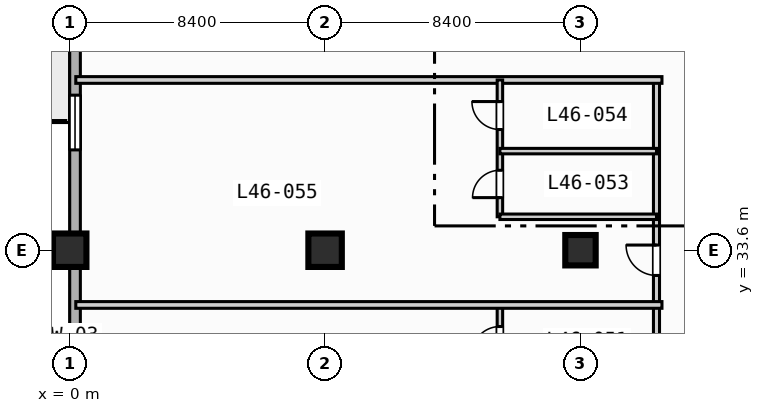
"""IFC4 building model, lengths in metres.
Left out: names, types, materials, properties, quantities, classifications, styles, units other than length and angle.
Written with IfcOpenShell. Run it as: python <this file> out.ifc"""

import sys

from ifc_helpers import new_model, si_unit, direction, frame, frame_2d, origin, origin_2d, place, context, subcontext, project, spatial, rectangle, extrude, element, fill, save


model = new_model("IFC4")
c1 = context("Model", 3, precision=1e-05, world=origin(), true_north=direction((0.0, 1.0)))
c2 = subcontext(c1, "Body", "Model", "MODEL_VIEW")
j1 = project(units=[si_unit("LENGTHUNIT", "METRE"), si_unit("PLANEANGLEUNIT", "RADIAN")], contexts=[c1])
p1 = place(None, origin())
s1 = spatial("IfcSite", under=j1, at=p1, CompositionType="ELEMENT")
p2 = place(p1, origin())
s2 = spatial("IfcBuilding", under=s1, at=p2, CompositionType="ELEMENT")
p3 = place(p2, frame((0.0, 0.0, 190.2)))
s3 = spatial("IfcBuildingStorey", under=s2, at=p3, CompositionType="ELEMENT", Elevation=190.2)
for number, where, z_axis, x_axis in (
    (1, (0.0, 33.6, 0.0), (0.0, 0.0, 1.0), (1.0, 0.0, 0.0)),
    (2, (8.4, 33.6, 0.0), (0.0, 0.0, 1.0), (1.0, 0.0, 0.0)),
):
    element("IfcColumn", number, at=place(p3, frame(where, z_axis=z_axis, x_axis=x_axis)), inside=s3, PredefinedType="COLUMN", context=c2, shape_type="SweptSolid", body=[
        extrude(rectangle(XDim=1.1, YDim=1.1, at=origin_2d()), origin(), (0.0, 0.0, 1.0), 3.7),
    ])
p4 = place(p3, frame((16.8, 33.6, 0.0), z_axis=(0.0, 0.0, 1.0), x_axis=(1.0, 0.0, 0.0)))
e3 = element("IfcColumn", 3, at=p4, inside=s3, PredefinedType="COLUMN", context=c2, shape_type="SweptSolid", body=[
    extrude(rectangle(XDim=1.0, YDim=1.0, at=origin_2d()), origin(), (0.0, 0.0, 1.0), 3.7),
])
p5 = place(p3, frame((0.175, 3.175, 0.0), z_axis=(0.0, 0.0, 1.0), x_axis=(0.0, 1.0, 0.0)))
e4 = element("IfcWall", 4, at=p5, inside=s3, PredefinedType="STANDARD", context=c2, shape_type="SweptSolid", body=[
    extrude(rectangle(XDim=69.25, YDim=0.35, at=frame_2d((34.625, 0.0))), origin(), (0.0, 0.0, 1.0), 3.47),
])
p6 = place(p5, frame((42.325, 0.0, 0.0)))
e5 = element("IfcOpeningElement", 5, at=p6, cuts=e4, PredefinedType="OPENING", context=c2, shape_type="SweptSolid", body=[
    extrude(rectangle(XDim=1.4, YDim=2.2, at=frame_2d((0.7, 1.1))), frame((0.0, 0.185, 0.0), z_axis=(0.0, -1.0, 0.0), x_axis=(1.0, 0.0, 0.0)), (0.0, 0.0, 1.0), 0.37),
])
p7 = place(p5, frame((25.025, 0.0, 0.85)))
e6 = element("IfcOpeningElement", 6, at=p7, cuts=e4, PredefinedType="OPENING", context=c2, shape_type="SweptSolid", body=[
    extrude(rectangle(XDim=2.4, YDim=1.95, at=frame_2d((1.2, 0.975))), frame((0.0, 0.185, 0.0), z_axis=(0.0, -1.0, 0.0), x_axis=(1.0, 0.0, 0.0)), (0.0, 0.0, 1.0), 0.37),
])
p8 = place(p5, frame((33.725, 0.0, 0.85)))
e7 = element("IfcOpeningElement", 7, at=p8, cuts=e4, PredefinedType="OPENING", context=c2, shape_type="SweptSolid", body=[
    extrude(rectangle(XDim=1.8, YDim=1.8, at=frame_2d((0.9, 0.9))), frame((0.0, 0.185, 0.0), z_axis=(0.0, -1.0, 0.0), x_axis=(1.0, 0.0, 0.0)), (0.0, 0.0, 1.0), 0.37),
])
p9 = place(p5, frame((58.375, 0.0, 0.85)))
e8 = element("IfcOpeningElement", 8, at=p9, cuts=e4, PredefinedType="OPENING", context=c2, shape_type="SweptSolid", body=[
    extrude(rectangle(XDim=1.8, YDim=1.8, at=frame_2d((0.9, 0.9))), frame((0.0, 0.185, 0.0), z_axis=(0.0, -1.0, 0.0), x_axis=(1.0, 0.0, 0.0)), (0.0, 0.0, 1.0), 0.37),
])
p10 = place(p5, frame((64.775, 0.0, 0.85)))
e9 = element("IfcOpeningElement", 9, at=p10, cuts=e4, PredefinedType="OPENING", context=c2, shape_type="SweptSolid", body=[
    extrude(rectangle(XDim=1.8, YDim=1.8, at=frame_2d((0.9, 0.9))), frame((0.0, 0.185, 0.0), z_axis=(0.0, -1.0, 0.0), x_axis=(1.0, 0.0, 0.0)), (0.0, 0.0, 1.0), 0.37),
])
p11 = place(p3, frame((19.3, 24.4, 0.0), z_axis=(0.0, 0.0, 1.0), x_axis=(0.0, 1.0, 0.0)))
e10 = element("IfcWall", 10, at=p11, inside=s3, PredefinedType="PARTITIONING", context=c2, shape_type="SweptSolid", body=[
    extrude(rectangle(XDim=14.8, YDim=0.2, at=frame_2d((7.4, 0.0))), origin(), (0.0, 0.0, 1.0), 3.47),
])
p12 = place(p11, frame((0.97, 0.0, 0.0)))
e11 = element("IfcOpeningElement", 11, at=p12, cuts=e10, PredefinedType="OPENING", context=c2, shape_type="SweptSolid", body=[
    extrude(rectangle(XDim=1.0, YDim=2.15, at=frame_2d((0.5, 1.075))), frame((0.0, 0.11, 0.0), z_axis=(0.0, -1.0, 0.0), x_axis=(1.0, 0.0, 0.0)), (0.0, 0.0, 1.0), 0.22),
])
p13 = place(p11, frame((8.37, 0.0, 0.0)))
e12 = element("IfcOpeningElement", 12, at=p13, cuts=e10, PredefinedType="OPENING", context=c2, shape_type="SweptSolid", body=[
    extrude(rectangle(XDim=1.0, YDim=2.15, at=frame_2d((0.5, 1.075))), frame((0.0, 0.11, 0.0), z_axis=(0.0, -1.0, 0.0), x_axis=(1.0, 0.0, 0.0)), (0.0, 0.0, 1.0), 0.22),
])
p14 = place(p3, frame((14.15, 27.3, 0.0), z_axis=(0.0, 0.0, 1.0), x_axis=(0.0, 1.0, 0.0)))
e13 = element("IfcWall", 13, at=p14, inside=s3, PredefinedType="PLUMBINGWALL", context=c2, shape_type="SweptSolid", body=[
    extrude(rectangle(XDim=4.5, YDim=0.18, at=frame_2d((2.25, 0.0))), origin(), (0.0, 0.0, 1.0), 3.47),
])
p15 = place(p14, frame((0.63, 0.0, 0.0)))
e14 = element("IfcOpeningElement", 14, at=p15, cuts=e13, PredefinedType="OPENING", context=c2, shape_type="SweptSolid", body=[
    extrude(rectangle(XDim=0.9, YDim=2.1, at=frame_2d((0.45, 1.05))), frame((0.0, 0.1, 0.0), z_axis=(0.0, -1.0, 0.0), x_axis=(1.0, 0.0, 0.0)), (0.0, 0.0, 1.0), 0.2),
])
p16 = place(p14, frame((2.87, 0.0, 0.0)))
e15 = element("IfcOpeningElement", 15, at=p16, cuts=e13, PredefinedType="OPENING", context=c2, shape_type="SweptSolid", body=[
    extrude(rectangle(XDim=0.92, YDim=2.1, at=frame_2d((0.46, 1.05))), frame((0.0, 0.1, 0.0), z_axis=(0.0, -1.0, 0.0), x_axis=(1.0, 0.0, 0.0)), (0.0, 0.0, 1.0), 0.2),
])
for number, where, z_axis, x_axis in (
    (16, (0.2, 31.8, 0.0), (0.0, 0.0, 1.0), (1.0, 0.0, 0.0)),
    (17, (0.2, 39.2, 0.0), (0.0, 0.0, 1.0), (1.0, 0.0, 0.0)),
):
    element("IfcWall", number, at=place(p3, frame(where, z_axis=z_axis, x_axis=x_axis)), inside=s3, PredefinedType="PARTITIONING", context=c2, shape_type="SweptSolid", body=[
        extrude(rectangle(XDim=19.28, YDim=0.22, at=frame_2d((9.64, 0.0))), origin(), (0.0, 0.0, 1.0), 3.47),
    ])
p17 = place(p3, frame((14.15, 34.7, 0.0), z_axis=(0.0, 0.0, 1.0), x_axis=(0.0, 1.0, 0.0)))
e18 = element("IfcWall", 18, at=p17, inside=s3, PredefinedType="PLUMBINGWALL", context=c2, shape_type="SweptSolid", body=[
    extrude(rectangle(XDim=4.5, YDim=0.18, at=frame_2d((2.25, 0.0))), origin(), (0.0, 0.0, 1.0), 3.47),
])
p18 = place(p17, frame((0.63, 0.0, 0.0)))
e19 = element("IfcOpeningElement", 19, at=p18, cuts=e18, PredefinedType="OPENING", context=c2, shape_type="SweptSolid", body=[
    extrude(rectangle(XDim=0.9, YDim=2.1, at=frame_2d((0.45, 1.05))), frame((0.0, 0.1, 0.0), z_axis=(0.0, -1.0, 0.0), x_axis=(1.0, 0.0, 0.0)), (0.0, 0.0, 1.0), 0.2),
])
p19 = place(p17, frame((2.87, 0.0, 0.0)))
e20 = element("IfcOpeningElement", 20, at=p19, cuts=e18, PredefinedType="OPENING", context=c2, shape_type="SweptSolid", body=[
    extrude(rectangle(XDim=0.92, YDim=2.1, at=frame_2d((0.46, 1.05))), frame((0.0, 0.1, 0.0), z_axis=(0.0, -1.0, 0.0), x_axis=(1.0, 0.0, 0.0)), (0.0, 0.0, 1.0), 0.2),
])
for number, where, z_axis, x_axis in (
    (21, (14.15, 34.7, 0.0), (0.0, 0.0, 1.0), (1.0, 0.0, 0.0)),
    (22, (14.15, 36.86, 0.0), (0.0, 0.0, 1.0), (1.0, 0.0, 0.0)),
):
    element("IfcWall", number, at=place(p3, frame(where, z_axis=z_axis, x_axis=x_axis)), inside=s3, PredefinedType="PLUMBINGWALL", context=c2, shape_type="SweptSolid", body=[
        extrude(rectangle(XDim=5.15, YDim=0.18, at=frame_2d((2.575, 0.0))), origin(), (0.0, 0.0, 1.0), 3.47),
    ])
p20 = place(p8, origin())
e23 = element("IfcWindow", 23, at=p20, inside=s3, PartitioningType="SINGLE_PANEL", PredefinedType="WINDOW", context=c2, shape_type="SweptSolid", body=[
    extrude(rectangle(XDim=1.8, YDim=1.8, at=frame_2d((0.9, 0.9))), frame((0.0, 0.03, 0.0), z_axis=(0.0, -1.0, 0.0), x_axis=(1.0, 0.0, 0.0)), (0.0, 0.0, 1.0), 0.06),
])
fill(e7, e23)
p21 = place(p13, origin())
e24 = element("IfcDoor", 24, at=p21, inside=s3, OperationType="SINGLE_SWING_RIGHT", PredefinedType="DOOR", context=c2, shape_type="SweptSolid", body=[
    extrude(rectangle(XDim=1.0, YDim=2.15, at=frame_2d((0.5, 1.075))), frame((0.0, 0.025, 0.0), z_axis=(0.0, -1.0, 0.0), x_axis=(1.0, 0.0, 0.0)), (0.0, 0.0, 1.0), 0.05),
])
fill(e12, e24)
p22 = place(p16, origin())
e25 = element("IfcDoor", 25, at=p22, inside=s3, OperationType="SINGLE_SWING_LEFT", PredefinedType="DOOR", context=c2, shape_type="SweptSolid", body=[
    extrude(rectangle(XDim=0.92, YDim=2.1, at=frame_2d((0.46, 1.05))), frame((0.0, 0.025, 0.0), z_axis=(0.0, -1.0, 0.0), x_axis=(1.0, 0.0, 0.0)), (0.0, 0.0, 1.0), 0.05),
])
fill(e15, e25)
p23 = place(p18, origin())
e26 = element("IfcDoor", 26, at=p23, inside=s3, OperationType="SINGLE_SWING_LEFT", PredefinedType="DOOR", context=c2, shape_type="SweptSolid", body=[
    extrude(rectangle(XDim=0.9, YDim=2.1, at=frame_2d((0.45, 1.05))), frame((0.0, 0.025, 0.0), z_axis=(0.0, -1.0, 0.0), x_axis=(1.0, 0.0, 0.0)), (0.0, 0.0, 1.0), 0.05),
])
fill(e19, e26)
p24 = place(p19, origin())
e27 = element("IfcDoor", 27, at=p24, inside=s3, OperationType="SINGLE_SWING_RIGHT", PredefinedType="DOOR", context=c2, shape_type="SweptSolid", body=[
    extrude(rectangle(XDim=0.92, YDim=2.1, at=frame_2d((0.46, 1.05))), frame((0.0, 0.025, 0.0), z_axis=(0.0, -1.0, 0.0), x_axis=(1.0, 0.0, 0.0)), (0.0, 0.0, 1.0), 0.05),
])
fill(e20, e27)
save(model, sys.argv[1])
